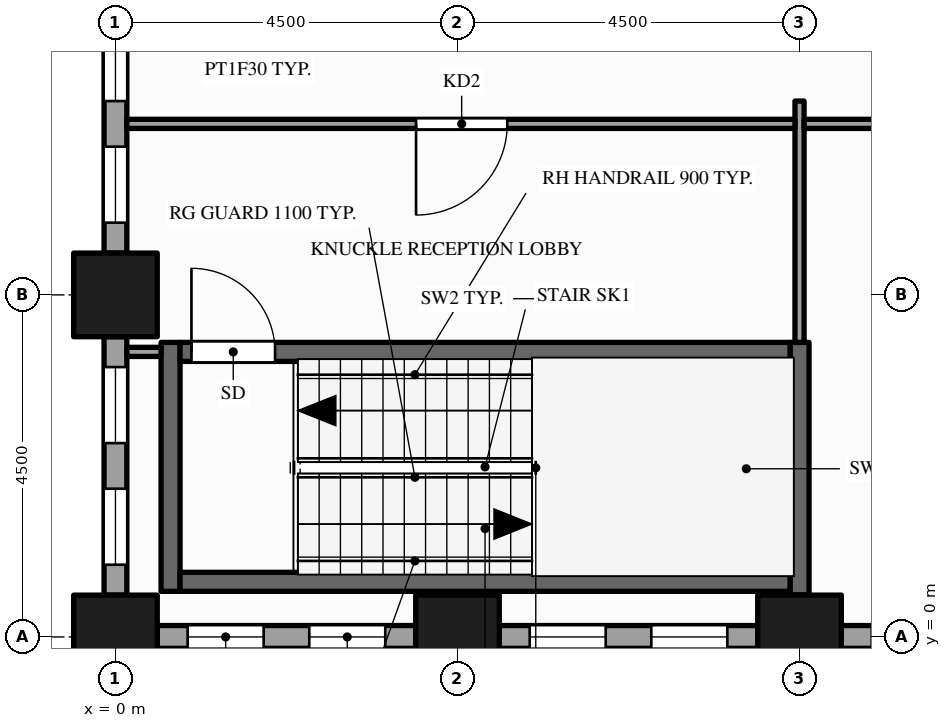
"""IFC4 building model, lengths in metres.
Left out: names, types, materials, properties, quantities, classifications, styles, units other than length and angle.
Written with IfcOpenShell. Run it as: python <this file> out.ifc"""

import sys

from ifc_helpers import new_model, si_unit, direction, frame, frame_2d, origin, origin_2d, place, context, subcontext, project, spatial, rectangle, hollow_rectangle, extrude, element, fill, save


model = new_model("IFC4")
c1 = context("Model", 3, precision=1e-05, world=origin(), true_north=direction((0.0, 1.0)))
c2 = subcontext(c1, "Body", "Model", "MODEL_VIEW")
j1 = project(units=[si_unit("LENGTHUNIT", "METRE"), si_unit("PLANEANGLEUNIT", "RADIAN")], contexts=[c1])
p1 = place(None, origin())
s1 = spatial("IfcSite", under=j1, at=p1, CompositionType="ELEMENT")
p2 = place(p1, origin())
s2 = spatial("IfcBuilding", under=s1, at=p2, CompositionType="ELEMENT")
p3 = place(p2, frame((0.0, 0.0, 57.0)))
s3 = spatial("IfcBuildingStorey", under=s2, at=p3, CompositionType="ELEMENT", Elevation=57.0)
for number, where, z_axis, x_axis in (
    (1, (0.0, 0.0, -0.15), (0.0, 0.0, 1.0), (1.0, 0.0, 0.0)),
    (2, (0.0, 4.5, -0.15), (0.0, 0.0, 1.0), (1.0, 0.0, 0.0)),
    (3, (4.5, 0.0, -0.15), (0.0, 0.0, 1.0), (1.0, 0.0, 0.0)),
    (4, (9.0, 0.0, -0.15), (0.0, 0.0, 1.0), (1.0, 0.0, 0.0)),
):
    element("IfcColumn", number, at=place(p3, frame(where, z_axis=z_axis, x_axis=x_axis)), inside=s3, PredefinedType="COLUMN", context=c2, shape_type="SweptSolid", body=[
        extrude(hollow_rectangle(XDim=1.1, YDim=1.1, WallThickness=0.06, at=origin_2d()), origin(), (0.0, 0.0, 1.0), 4.0),
    ])
p4 = place(p3, frame((0.55, 0.0, 0.0), z_axis=(0.0, 0.0, 1.0), x_axis=(1.0, 0.0, 0.0)))
e5 = element("IfcWall", 5, at=p4, inside=s3, PredefinedType="STANDARD", context=c2, shape_type="SweptSolid", body=[
    extrude(rectangle(XDim=3.4, YDim=0.3, at=frame_2d((1.7, 0.0))), origin(), (0.0, 0.0, 1.0), 3.144),
])
p5 = place(p4, frame((0.4, 0.0, 0.9)))
e6 = element("IfcOpeningElement", 6, at=p5, cuts=e5, PredefinedType="OPENING", context=c2, shape_type="SweptSolid", body=[
    extrude(rectangle(XDim=1.0, YDim=2.0, at=frame_2d((0.5, 1.0))), frame((0.0, 0.16, 0.0), z_axis=(0.0, -1.0, 0.0), x_axis=(1.0, 0.0, 0.0)), (0.0, 0.0, 1.0), 0.32),
])
p6 = place(p4, frame((2.0, 0.0, 0.9)))
e7 = element("IfcOpeningElement", 7, at=p6, cuts=e5, PredefinedType="OPENING", context=c2, shape_type="SweptSolid", body=[
    extrude(rectangle(XDim=1.0, YDim=2.0, at=frame_2d((0.5, 1.0))), frame((0.0, 0.16, 0.0), z_axis=(0.0, -1.0, 0.0), x_axis=(1.0, 0.0, 0.0)), (0.0, 0.0, 1.0), 0.32),
])
p7 = place(p3, frame((5.05, 0.0, 0.0), z_axis=(0.0, 0.0, 1.0), x_axis=(1.0, 0.0, 0.0)))
e8 = element("IfcWall", 8, at=p7, inside=s3, PredefinedType="STANDARD", context=c2, shape_type="SweptSolid", body=[
    extrude(rectangle(XDim=3.4, YDim=0.3, at=frame_2d((1.7, 0.0))), origin(), (0.0, 0.0, 1.0), 3.144),
])
p8 = place(p7, frame((0.4, 0.0, 0.9)))
e9 = element("IfcOpeningElement", 9, at=p8, cuts=e8, PredefinedType="OPENING", context=c2, shape_type="SweptSolid", body=[
    extrude(rectangle(XDim=1.0, YDim=2.0, at=frame_2d((0.5, 1.0))), frame((0.0, 0.16, 0.0), z_axis=(0.0, -1.0, 0.0), x_axis=(1.0, 0.0, 0.0)), (0.0, 0.0, 1.0), 0.32),
])
p9 = place(p7, frame((2.0, 0.0, 0.9)))
e10 = element("IfcOpeningElement", 10, at=p9, cuts=e8, PredefinedType="OPENING", context=c2, shape_type="SweptSolid", body=[
    extrude(rectangle(XDim=1.0, YDim=2.0, at=frame_2d((0.5, 1.0))), frame((0.0, 0.16, 0.0), z_axis=(0.0, -1.0, 0.0), x_axis=(1.0, 0.0, 0.0)), (0.0, 0.0, 1.0), 0.32),
])
p10 = place(p3, frame((9.55, 0.0, 0.0), z_axis=(0.0, 0.0, 1.0), x_axis=(1.0, 0.0, 0.0)))
e11 = element("IfcWall", 11, at=p10, inside=s3, PredefinedType="STANDARD", context=c2, shape_type="SweptSolid", body=[
    extrude(rectangle(XDim=3.4, YDim=0.3, at=frame_2d((1.7, 0.0))), origin(), (0.0, 0.0, 1.0), 3.144),
])
p11 = place(p10, frame((0.4, 0.0, 0.9)))
e12 = element("IfcOpeningElement", 12, at=p11, cuts=e11, PredefinedType="OPENING", context=c2, shape_type="SweptSolid", body=[
    extrude(rectangle(XDim=1.0, YDim=2.0, at=frame_2d((0.5, 1.0))), frame((0.0, 0.16, 0.0), z_axis=(0.0, -1.0, 0.0), x_axis=(1.0, 0.0, 0.0)), (0.0, 0.0, 1.0), 0.32),
])
p12 = place(p10, frame((2.0, 0.0, 0.9)))
e13 = element("IfcOpeningElement", 13, at=p12, cuts=e11, PredefinedType="OPENING", context=c2, shape_type="SweptSolid", body=[
    extrude(rectangle(XDim=1.0, YDim=2.0, at=frame_2d((0.5, 1.0))), frame((0.0, 0.16, 0.0), z_axis=(0.0, -1.0, 0.0), x_axis=(1.0, 0.0, 0.0)), (0.0, 0.0, 1.0), 0.32),
])
p13 = place(p3, frame((0.0, 8.45, 0.0), z_axis=(0.0, 0.0, 1.0), x_axis=(0.0, -1.0, 0.0)))
e14 = element("IfcWall", 14, at=p13, inside=s3, PredefinedType="STANDARD", context=c2, shape_type="SweptSolid", body=[
    extrude(rectangle(XDim=3.4, YDim=0.3, at=frame_2d((1.7, 0.0))), origin(), (0.0, 0.0, 1.0), 3.144),
])
p14 = place(p13, frame((0.4, 0.0, 0.9)))
e15 = element("IfcOpeningElement", 15, at=p14, cuts=e14, PredefinedType="OPENING", context=c2, shape_type="SweptSolid", body=[
    extrude(rectangle(XDim=1.0, YDim=2.0, at=frame_2d((0.5, 1.0))), frame((0.0, 0.16, 0.0), z_axis=(0.0, -1.0, 0.0), x_axis=(1.0, 0.0, 0.0)), (0.0, 0.0, 1.0), 0.32),
])
p15 = place(p13, frame((2.0, 0.0, 0.9)))
e16 = element("IfcOpeningElement", 16, at=p15, cuts=e14, PredefinedType="OPENING", context=c2, shape_type="SweptSolid", body=[
    extrude(rectangle(XDim=1.0, YDim=2.0, at=frame_2d((0.5, 1.0))), frame((0.0, 0.16, 0.0), z_axis=(0.0, -1.0, 0.0), x_axis=(1.0, 0.0, 0.0)), (0.0, 0.0, 1.0), 0.32),
])
p16 = place(p3, frame((0.0, 3.95, 0.0), z_axis=(0.0, 0.0, 1.0), x_axis=(0.0, -1.0, 0.0)))
e17 = element("IfcWall", 17, at=p16, inside=s3, PredefinedType="STANDARD", context=c2, shape_type="SweptSolid", body=[
    extrude(rectangle(XDim=3.4, YDim=0.3, at=frame_2d((1.7, 0.0))), origin(), (0.0, 0.0, 1.0), 3.144),
])
p17 = place(p16, frame((0.4, 0.0, 0.9)))
e18 = element("IfcOpeningElement", 18, at=p17, cuts=e17, PredefinedType="OPENING", context=c2, shape_type="SweptSolid", body=[
    extrude(rectangle(XDim=1.0, YDim=2.0, at=frame_2d((0.5, 1.0))), frame((0.0, 0.16, 0.0), z_axis=(0.0, -1.0, 0.0), x_axis=(1.0, 0.0, 0.0)), (0.0, 0.0, 1.0), 0.32),
])
p18 = place(p16, frame((2.0, 0.0, 0.9)))
e19 = element("IfcOpeningElement", 19, at=p18, cuts=e17, PredefinedType="OPENING", context=c2, shape_type="SweptSolid", body=[
    extrude(rectangle(XDim=1.0, YDim=2.0, at=frame_2d((0.5, 1.0))), frame((0.0, 0.16, 0.0), z_axis=(0.0, -1.0, 0.0), x_axis=(1.0, 0.0, 0.0)), (0.0, 0.0, 1.0), 0.32),
])
p19 = place(p3, frame((0.725, 0.6, 0.0), z_axis=(0.0, 0.0, 1.0), x_axis=(0.0, 1.0, 0.0)))
e20 = element("IfcWall", 20, at=p19, inside=s3, PredefinedType="SHEAR", context=c2, shape_type="SweptSolid", body=[
    extrude(rectangle(XDim=3.275, YDim=0.25, at=frame_2d((1.637, 0.0))), origin(), (0.0, 0.0, 1.0), 3.85),
])
p20 = place(p3, frame((9.0, 0.15, 0.0), z_axis=(0.0, 0.0, 1.0), x_axis=(0.0, 1.0, 0.0)))
e21 = element("IfcWall", 21, at=p20, inside=s3, PredefinedType="PARTITIONING", context=c2, shape_type="SweptSolid", body=[
    extrude(rectangle(XDim=0.4, YDim=0.12, at=frame_2d((0.2, 0.0))), origin(), (0.0, 0.0, 1.0), 3.85),
])
p21 = place(p3, frame((9.0, 0.55, 0.0), z_axis=(0.0, 0.0, 1.0), x_axis=(0.0, 1.0, 0.0)))
e22 = element("IfcWall", 22, at=p21, inside=s3, PredefinedType="SHEAR", context=c2, shape_type="SweptSolid", body=[
    extrude(rectangle(XDim=3.325, YDim=0.25, at=frame_2d((1.663, 0.0))), origin(), (0.0, 0.0, 1.0), 3.85),
])
p22 = place(p3, frame((9.0, 3.875, 0.0), z_axis=(0.0, 0.0, 1.0), x_axis=(0.0, 1.0, 0.0)))
e23 = element("IfcWall", 23, at=p22, inside=s3, PredefinedType="PARTITIONING", context=c2, shape_type="SweptSolid", body=[
    extrude(rectangle(XDim=3.175, YDim=0.12, at=frame_2d((1.587, 0.0))), origin(), (0.0, 0.0, 1.0), 2.938),
])
p23 = place(p3, frame((0.85, 0.725, 0.0), z_axis=(0.0, 0.0, 1.0), x_axis=(1.0, 0.0, 0.0)))
e24 = element("IfcWall", 24, at=p23, inside=s3, PredefinedType="SHEAR", context=c2, shape_type="SweptSolid", body=[
    extrude(rectangle(XDim=8.025, YDim=0.25, at=frame_2d((4.012, 0.0))), origin(), (0.0, 0.0, 1.0), 3.85),
])
p24 = place(p3, frame((0.15, 3.75, 0.0), z_axis=(0.0, 0.0, 1.0), x_axis=(1.0, 0.0, 0.0)))
e25 = element("IfcWall", 25, at=p24, inside=s3, PredefinedType="PARTITIONING", context=c2, shape_type="SweptSolid", body=[
    extrude(rectangle(XDim=0.45, YDim=0.12, at=frame_2d((0.225, 0.0))), origin(), (0.0, 0.0, 1.0), 3.144),
])
p25 = place(p3, frame((0.85, 3.75, 0.0), z_axis=(0.0, 0.0, 1.0), x_axis=(1.0, 0.0, 0.0)))
e26 = element("IfcWall", 26, at=p25, inside=s3, PredefinedType="SHEAR", context=c2, shape_type="SweptSolid", body=[
    extrude(rectangle(XDim=8.025, YDim=0.25, at=frame_2d((4.012, 0.0))), origin(), (0.0, 0.0, 1.0), 3.85),
])
p26 = place(p25, frame((0.15, 0.0, 0.0)))
e27 = element("IfcOpeningElement", 27, at=p26, cuts=e26, PredefinedType="OPENING", context=c2, shape_type="SweptSolid", body=[
    extrude(rectangle(XDim=1.1, YDim=2.1, at=frame_2d((0.55, 1.05))), frame((0.0, 0.135, 0.0), z_axis=(0.0, -1.0, 0.0), x_axis=(1.0, 0.0, 0.0)), (0.0, 0.0, 1.0), 0.27),
])
p27 = place(p3, frame((0.15, 6.75, 0.0), z_axis=(0.0, 0.0, 1.0), x_axis=(1.0, 0.0, 0.0)))
e28 = element("IfcWall", 28, at=p27, inside=s3, PredefinedType="PARTITIONING", context=c2, shape_type="SweptSolid", body=[
    extrude(rectangle(XDim=8.79, YDim=0.12, at=frame_2d((4.395, 0.0))), origin(), (0.0, 0.0, 1.0), 2.938),
])
p28 = place(p27, frame((3.805, 0.0, 0.0)))
e29 = element("IfcOpeningElement", 29, at=p28, cuts=e28, PredefinedType="OPENING", context=c2, shape_type="SweptSolid", body=[
    extrude(rectangle(XDim=1.2, YDim=2.1, at=frame_2d((0.6, 1.05))), frame((0.0, 0.07, 0.0), z_axis=(0.0, -1.0, 0.0), x_axis=(1.0, 0.0, 0.0)), (0.0, 0.0, 1.0), 0.14),
])
p29 = place(p3, frame((9.06, 6.75, 0.0), z_axis=(0.0, 0.0, 1.0), x_axis=(1.0, 0.0, 0.0)))
e30 = element("IfcWall", 30, at=p29, inside=s3, PredefinedType="PARTITIONING", context=c2, shape_type="SweptSolid", body=[
    extrude(rectangle(XDim=4.38, YDim=0.12, at=frame_2d((2.19, 0.0))), origin(), (0.0, 0.0, 1.0), 2.938),
])
p30 = place(p29, frame((1.69, 0.0, 0.0)))
e31 = element("IfcOpeningElement", 31, at=p30, cuts=e30, PredefinedType="OPENING", context=c2, shape_type="SweptSolid", body=[
    extrude(rectangle(XDim=1.0, YDim=2.1, at=frame_2d((0.5, 1.05))), frame((0.0, 0.07, 0.0), z_axis=(0.0, -1.0, 0.0), x_axis=(1.0, 0.0, 0.0)), (0.0, 0.0, 1.0), 0.14),
])
p31 = place(p5, origin())
e32 = element("IfcWindow", 32, at=p31, inside=s3, PartitioningType="SINGLE_PANEL", PredefinedType="WINDOW", context=c2, shape_type="SweptSolid", body=[
    extrude(rectangle(XDim=1.0, YDim=2.0, at=frame_2d((0.5, 1.0))), frame((0.0, 0.03, 0.0), z_axis=(0.0, -1.0, 0.0), x_axis=(1.0, 0.0, 0.0)), (0.0, 0.0, 1.0), 0.06),
])
fill(e6, e32)
p32 = place(p6, origin())
e33 = element("IfcWindow", 33, at=p32, inside=s3, PartitioningType="SINGLE_PANEL", PredefinedType="WINDOW", context=c2, shape_type="SweptSolid", body=[
    extrude(rectangle(XDim=1.0, YDim=2.0, at=frame_2d((0.5, 1.0))), frame((0.0, 0.03, 0.0), z_axis=(0.0, -1.0, 0.0), x_axis=(1.0, 0.0, 0.0)), (0.0, 0.0, 1.0), 0.06),
])
fill(e7, e33)
p33 = place(p8, origin())
e34 = element("IfcWindow", 34, at=p33, inside=s3, PartitioningType="SINGLE_PANEL", PredefinedType="WINDOW", context=c2, shape_type="SweptSolid", body=[
    extrude(rectangle(XDim=1.0, YDim=2.0, at=frame_2d((0.5, 1.0))), frame((0.0, 0.03, 0.0), z_axis=(0.0, -1.0, 0.0), x_axis=(1.0, 0.0, 0.0)), (0.0, 0.0, 1.0), 0.06),
])
fill(e9, e34)
p34 = place(p9, origin())
e35 = element("IfcWindow", 35, at=p34, inside=s3, PartitioningType="SINGLE_PANEL", PredefinedType="WINDOW", context=c2, shape_type="SweptSolid", body=[
    extrude(rectangle(XDim=1.0, YDim=2.0, at=frame_2d((0.5, 1.0))), frame((0.0, 0.03, 0.0), z_axis=(0.0, -1.0, 0.0), x_axis=(1.0, 0.0, 0.0)), (0.0, 0.0, 1.0), 0.06),
])
fill(e10, e35)
p35 = place(p14, origin())
e36 = element("IfcWindow", 36, at=p35, inside=s3, PartitioningType="SINGLE_PANEL", PredefinedType="WINDOW", context=c2, shape_type="SweptSolid", body=[
    extrude(rectangle(XDim=1.0, YDim=2.0, at=frame_2d((0.5, 1.0))), frame((0.0, 0.03, 0.0), z_axis=(0.0, -1.0, 0.0), x_axis=(1.0, 0.0, 0.0)), (0.0, 0.0, 1.0), 0.06),
])
fill(e15, e36)
p36 = place(p15, origin())
e37 = element("IfcWindow", 37, at=p36, inside=s3, PartitioningType="SINGLE_PANEL", PredefinedType="WINDOW", context=c2, shape_type="SweptSolid", body=[
    extrude(rectangle(XDim=1.0, YDim=2.0, at=frame_2d((0.5, 1.0))), frame((0.0, 0.03, 0.0), z_axis=(0.0, -1.0, 0.0), x_axis=(1.0, 0.0, 0.0)), (0.0, 0.0, 1.0), 0.06),
])
fill(e16, e37)
p37 = place(p17, origin())
e38 = element("IfcWindow", 38, at=p37, inside=s3, PartitioningType="SINGLE_PANEL", PredefinedType="WINDOW", context=c2, shape_type="SweptSolid", body=[
    extrude(rectangle(XDim=1.0, YDim=2.0, at=frame_2d((0.5, 1.0))), frame((0.0, 0.03, 0.0), z_axis=(0.0, -1.0, 0.0), x_axis=(1.0, 0.0, 0.0)), (0.0, 0.0, 1.0), 0.06),
])
fill(e18, e38)
p38 = place(p18, origin())
e39 = element("IfcWindow", 39, at=p38, inside=s3, PartitioningType="SINGLE_PANEL", PredefinedType="WINDOW", context=c2, shape_type="SweptSolid", body=[
    extrude(rectangle(XDim=1.0, YDim=2.0, at=frame_2d((0.5, 1.0))), frame((0.0, 0.03, 0.0), z_axis=(0.0, -1.0, 0.0), x_axis=(1.0, 0.0, 0.0)), (0.0, 0.0, 1.0), 0.06),
])
fill(e19, e39)
p39 = place(p26, origin())
e40 = element("IfcDoor", 40, at=p39, inside=s3, OperationType="SINGLE_SWING_LEFT", PredefinedType="DOOR", context=c2, shape_type="SweptSolid", body=[
    extrude(rectangle(XDim=1.1, YDim=2.1, at=frame_2d((0.55, 1.05))), frame((0.0, 0.025, 0.0), z_axis=(0.0, -1.0, 0.0), x_axis=(1.0, 0.0, 0.0)), (0.0, 0.0, 1.0), 0.05),
])
fill(e27, e40)
p40 = place(p28, origin())
e41 = element("IfcDoor", 41, at=p40, inside=s3, OperationType="SINGLE_SWING_LEFT", PredefinedType="DOOR", context=c2, shape_type="SweptSolid", body=[
    extrude(rectangle(XDim=1.2, YDim=2.1, at=frame_2d((0.6, 1.05))), frame((0.0, 0.025, 0.0), z_axis=(0.0, -1.0, 0.0), x_axis=(1.0, 0.0, 0.0)), (0.0, 0.0, 1.0), 0.05),
])
fill(e29, e41)
save(model, sys.argv[1])
